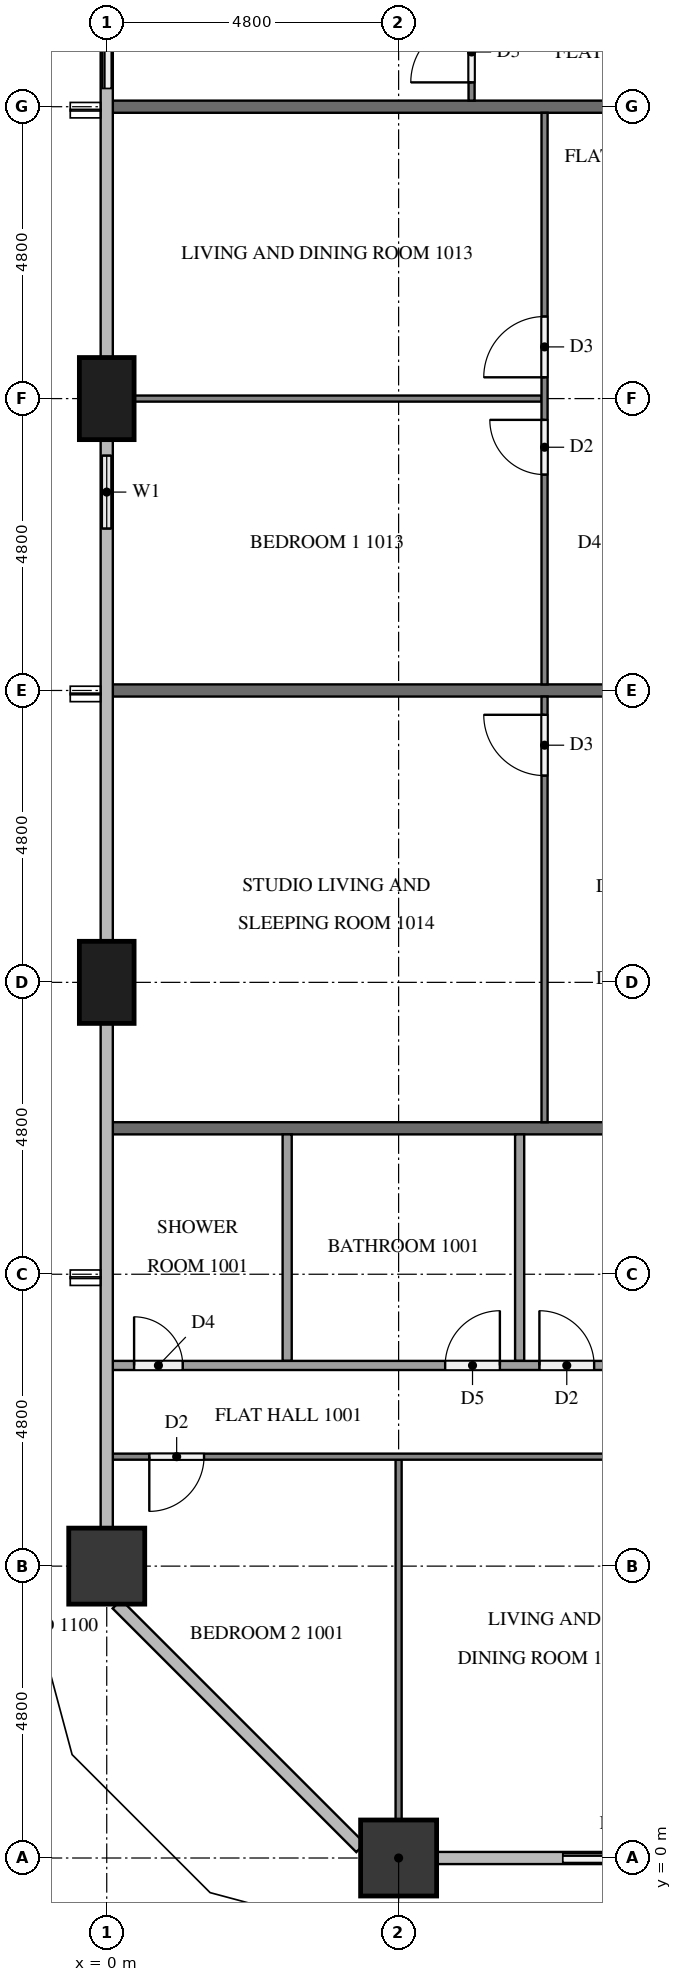
"""IFC4 building model, lengths in metres.
Left out: names, types, materials, properties, quantities, classifications, styles, units other than length and angle.
Written with IfcOpenShell. Run it as: python <this file> out.ifc"""

import sys

from ifc_helpers import new_model, si_unit, direction, frame, frame_2d, origin, origin_2d, place, context, subcontext, project, spatial, rectangle, extrude, element, fill, save


model = new_model("IFC4")
c1 = context("Model", 3, precision=1e-05, world=origin(), true_north=direction((0.0, 1.0)))
c2 = subcontext(c1, "Body", "Model", "MODEL_VIEW")
j1 = project(units=[si_unit("LENGTHUNIT", "METRE"), si_unit("PLANEANGLEUNIT", "RADIAN")], contexts=[c1])
p1 = place(None, origin())
s1 = spatial("IfcSite", under=j1, at=p1, CompositionType="ELEMENT")
p2 = place(p1, origin())
s2 = spatial("IfcBuilding", under=s1, at=p2, CompositionType="ELEMENT")
p3 = place(p2, frame((0.0, 0.0, 43.4)))
s3 = spatial("IfcBuildingStorey", under=s2, at=p3, CompositionType="ELEMENT", Elevation=43.4)
p4 = place(p3, frame((4.8, 0.0, 0.0), z_axis=(0.0, 0.0, 1.0), x_axis=(1.0, 0.0, 0.0)))
e1 = element("IfcColumn", 1, at=p4, inside=s3, PredefinedType="COLUMN", context=c2, shape_type="SweptSolid", body=[
    extrude(rectangle(XDim=1.25, YDim=1.25, at=origin_2d()), origin(), (0.0, 0.0, 1.0), 3.2),
])
for number, where, z_axis, x_axis in (
    (2, (0.0, 24.0, 0.0), (0.0, 0.0, 1.0), (0.0, 1.0, 0.0)),
    (3, (0.0, 14.4, 0.0), (0.0, 0.0, 1.0), (0.0, 1.0, 0.0)),
):
    element("IfcColumn", number, at=place(p3, frame(where, z_axis=z_axis, x_axis=x_axis)), inside=s3, PredefinedType="COLUMN", context=c2, shape_type="SweptSolid", body=[
        extrude(rectangle(XDim=1.35, YDim=0.9, at=origin_2d()), origin(), (0.0, 0.0, 1.0), 3.2),
    ])
p5 = place(p3, frame((0.0, 4.8, 0.0), z_axis=(0.0, 0.0, 1.0), x_axis=(1.0, 0.0, 0.0)))
e4 = element("IfcColumn", 4, at=p5, inside=s3, PredefinedType="COLUMN", context=c2, shape_type="SweptSolid", body=[
    extrude(rectangle(XDim=1.25, YDim=1.25, at=origin_2d()), origin(), (0.0, 0.0, 1.0), 3.2),
])
p6 = place(p3, frame((7.2, 0.0, 0.0), z_axis=(0.0, 0.0, 1.0), x_axis=(1.0, 0.0, 0.0)))
e5 = element("IfcWall", 5, at=p6, inside=s3, PredefinedType="SOLIDWALL", context=c2, shape_type="SweptSolid", body=[
    extrude(rectangle(XDim=2.4, YDim=0.15, at=frame_2d((1.2, 0.0))), origin(), (0.0, 0.0, 1.0), 3.2),
])
p7 = place(p6, frame((0.3, 0.0, 0.0)))
e6 = element("IfcOpeningElement", 6, at=p7, cuts=e5, PredefinedType="OPENING", context=c2, shape_type="SweptSolid", body=[
    extrude(rectangle(XDim=1.8, YDim=2.4, at=frame_2d((0.9, 1.2))), frame((0.0, 0.085, 0.0), z_axis=(0.0, -1.0, 0.0), x_axis=(1.0, 0.0, 0.0)), (0.0, 0.0, 1.0), 0.17),
])
p8 = place(p3, frame((0.0, 31.2, 0.0), z_axis=(0.0, 0.0, 1.0), x_axis=(0.0, -1.0, 0.0)))
e7 = element("IfcWall", 7, at=p8, inside=s3, PredefinedType="SOLIDWALL", context=c2, shape_type="SweptSolid", body=[
    extrude(rectangle(XDim=2.4, YDim=0.15, at=frame_2d((1.2, 0.0))), origin(), (0.0, 0.0, 1.0), 3.2),
])
p9 = place(p8, frame((0.3, 0.0, 0.0)))
e8 = element("IfcOpeningElement", 8, at=p9, cuts=e7, PredefinedType="OPENING", context=c2, shape_type="SweptSolid", body=[
    extrude(rectangle(XDim=1.8, YDim=2.4, at=frame_2d((0.9, 1.2))), frame((0.0, 0.085, 0.0), z_axis=(0.0, -1.0, 0.0), x_axis=(1.0, 0.0, 0.0)), (0.0, 0.0, 1.0), 0.17),
])
p10 = place(p3, frame((0.0, 23.325, 0.0), z_axis=(0.0, 0.0, 1.0), x_axis=(0.0, -1.0, 0.0)))
e9 = element("IfcWall", 9, at=p10, inside=s3, PredefinedType="SOLIDWALL", context=c2, shape_type="SweptSolid", body=[
    extrude(rectangle(XDim=1.725, YDim=0.15, at=frame_2d((0.862, 0.0))), origin(), (0.0, 0.0, 1.0), 3.2),
])
p11 = place(p10, frame((0.262, 0.0, 0.9)))
e10 = element("IfcOpeningElement", 10, at=p11, cuts=e9, PredefinedType="OPENING", context=c2, shape_type="SweptSolid", body=[
    extrude(rectangle(XDim=1.2, YDim=1.4, at=frame_2d((0.6, 0.7))), frame((0.0, 0.085, 0.0), z_axis=(0.0, -1.0, 0.0), x_axis=(1.0, 0.0, 0.0)), (0.0, 0.0, 1.0), 0.17),
])
for number, where, z_axis, x_axis in (
    (11, (0.1, 12.0, 0.0), (0.0, 0.0, 1.0), (1.0, 0.0, 0.0)),
    (12, (0.1, 28.8, 0.0), (0.0, 0.0, 1.0), (1.0, 0.0, 0.0)),
    (13, (0.1, 19.2, 0.0), (0.0, 0.0, 1.0), (1.0, 0.0, 0.0)),
):
    element("IfcWall", number, at=place(p3, frame(where, z_axis=z_axis, x_axis=x_axis)), inside=s3, PredefinedType="PARTITIONING", context=c2, shape_type="SweptSolid", body=[
        extrude(rectangle(XDim=11.8, YDim=0.2, at=frame_2d((5.9, 0.0))), origin(), (0.0, 0.0, 1.0), 3.2),
    ])
p12 = place(p3, frame((4.8, 6.55, 0.0), z_axis=(0.0, 0.0, 1.0), x_axis=(0.0, -1.0, 0.0)))
e14 = element("IfcWall", 14, at=p12, inside=s3, PredefinedType="PARTITIONING", context=c2, shape_type="SweptSolid", body=[
    extrude(rectangle(XDim=5.925, YDim=0.1, at=frame_2d((2.962, 0.0))), origin(), (0.0, 0.0, 1.0), 3.2),
])
p13 = place(p3, frame((14.3, 6.6, 0.0), z_axis=(0.0, 0.0, 1.0), x_axis=(-1.0, 0.0, 0.0)))
e15 = element("IfcWall", 15, at=p13, inside=s3, PredefinedType="PARTITIONING", context=c2, shape_type="SweptSolid", body=[
    extrude(rectangle(XDim=14.2, YDim=0.1, at=frame_2d((7.1, 0.0))), origin(), (0.0, 0.0, 1.0), 3.2),
])
p14 = place(p13, frame((3.45, 0.0, 0.0)))
e16 = element("IfcOpeningElement", 16, at=p14, cuts=e15, PredefinedType="OPENING", context=c2, shape_type="SweptSolid", body=[
    extrude(rectangle(XDim=0.9, YDim=2.1, at=frame_2d((0.45, 1.05))), frame((0.0, 0.06, 0.0), z_axis=(0.0, -1.0, 0.0), x_axis=(1.0, 0.0, 0.0)), (0.0, 0.0, 1.0), 0.12),
])
p15 = place(p13, frame((5.05, 0.0, 0.0)))
e17 = element("IfcOpeningElement", 17, at=p15, cuts=e15, PredefinedType="OPENING", context=c2, shape_type="SweptSolid", body=[
    extrude(rectangle(XDim=1.0, YDim=2.1, at=frame_2d((0.5, 1.05))), frame((0.0, 0.06, 0.0), z_axis=(0.0, -1.0, 0.0), x_axis=(1.0, 0.0, 0.0)), (0.0, 0.0, 1.0), 0.12),
])
p16 = place(p13, frame((12.7, 0.0, 0.0)))
e18 = element("IfcOpeningElement", 18, at=p16, cuts=e15, PredefinedType="OPENING", context=c2, shape_type="SweptSolid", body=[
    extrude(rectangle(XDim=0.9, YDim=2.1, at=frame_2d((0.45, 1.05))), frame((0.0, 0.06, 0.0), z_axis=(0.0, -1.0, 0.0), x_axis=(1.0, 0.0, 0.0)), (0.0, 0.0, 1.0), 0.12),
])
for number, where, z_axis, x_axis in (
    (19, (6.79, 11.9, 0.0), (0.0, 0.0, 1.0), (0.0, -1.0, 0.0)),
    (20, (2.967, 11.9, 0.0), (0.0, 0.0, 1.0), (0.0, -1.0, 0.0)),
):
    element("IfcWall", number, at=place(p3, frame(where, z_axis=z_axis, x_axis=x_axis)), inside=s3, PredefinedType="PARTITIONING", context=c2, shape_type="SweptSolid", body=[
        extrude(rectangle(XDim=3.725, YDim=0.15, at=frame_2d((1.862, 0.0))), origin(), (0.0, 0.0, 1.0), 3.2),
    ])
p17 = place(p3, frame((0.1, 8.1, 0.0), z_axis=(0.0, 0.0, 1.0), x_axis=(1.0, 0.0, 0.0)))
e21 = element("IfcWall", 21, at=p17, inside=s3, PredefinedType="PARTITIONING", context=c2, shape_type="SweptSolid", body=[
    extrude(rectangle(XDim=12.425, YDim=0.15, at=frame_2d((6.212, 0.0))), origin(), (0.0, 0.0, 1.0), 3.2),
])
p18 = place(p17, frame((7.015, 0.0, 0.0)))
e22 = element("IfcOpeningElement", 22, at=p18, cuts=e21, PredefinedType="OPENING", context=c2, shape_type="SweptSolid", body=[
    extrude(rectangle(XDim=0.9, YDim=2.1, at=frame_2d((0.45, 1.05))), frame((0.0, 0.085, 0.0), z_axis=(0.0, -1.0, 0.0), x_axis=(1.0, 0.0, 0.0)), (0.0, 0.0, 1.0), 0.17),
])
p19 = place(p17, frame((5.465, 0.0, 0.0)))
e23 = element("IfcOpeningElement", 23, at=p19, cuts=e21, PredefinedType="OPENING", context=c2, shape_type="SweptSolid", body=[
    extrude(rectangle(XDim=0.9, YDim=2.1, at=frame_2d((0.45, 1.05))), frame((0.0, 0.085, 0.0), z_axis=(0.0, -1.0, 0.0), x_axis=(1.0, 0.0, 0.0)), (0.0, 0.0, 1.0), 0.17),
])
p20 = place(p17, frame((0.35, 0.0, 0.0)))
e24 = element("IfcOpeningElement", 24, at=p20, cuts=e21, PredefinedType="OPENING", context=c2, shape_type="SweptSolid", body=[
    extrude(rectangle(XDim=0.8, YDim=2.1, at=frame_2d((0.4, 1.05))), frame((0.0, 0.085, 0.0), z_axis=(0.0, -1.0, 0.0), x_axis=(1.0, 0.0, 0.0)), (0.0, 0.0, 1.0), 0.17),
])
p21 = place(p3, frame((6.0, 28.9, 0.0), z_axis=(0.0, 0.0, 1.0), x_axis=(0.0, 1.0, 0.0)))
e25 = element("IfcWall", 25, at=p21, inside=s3, PredefinedType="PARTITIONING", context=c2, shape_type="SweptSolid", body=[
    extrude(rectangle(XDim=9.4, YDim=0.1, at=frame_2d((4.7, 0.0))), origin(), (0.0, 0.0, 1.0), 3.2),
])
p22 = place(p21, frame((0.3, 0.0, 0.0)))
e26 = element("IfcOpeningElement", 26, at=p22, cuts=e25, PredefinedType="OPENING", context=c2, shape_type="SweptSolid", body=[
    extrude(rectangle(XDim=1.0, YDim=2.1, at=frame_2d((0.5, 1.05))), frame((0.0, 0.06, 0.0), z_axis=(0.0, -1.0, 0.0), x_axis=(1.0, 0.0, 0.0)), (0.0, 0.0, 1.0), 0.12),
])
p23 = place(p21, frame((8.2, 0.0, 0.0)))
e27 = element("IfcOpeningElement", 27, at=p23, cuts=e25, PredefinedType="OPENING", context=c2, shape_type="SweptSolid", body=[
    extrude(rectangle(XDim=0.9, YDim=2.1, at=frame_2d((0.45, 1.05))), frame((0.0, 0.06, 0.0), z_axis=(0.0, -1.0, 0.0), x_axis=(1.0, 0.0, 0.0)), (0.0, 0.0, 1.0), 0.12),
])
p24 = place(p3, frame((7.15, 24.0, 0.0), z_axis=(0.0, 0.0, 1.0), x_axis=(-1.0, 0.0, 0.0)))
e28 = element("IfcWall", 28, at=p24, inside=s3, PredefinedType="PARTITIONING", context=c2, shape_type="SweptSolid", body=[
    extrude(rectangle(XDim=6.7, YDim=0.1, at=frame_2d((3.35, 0.0))), origin(), (0.0, 0.0, 1.0), 3.2),
])
p25 = place(p3, frame((7.2, 19.3, 0.0), z_axis=(0.0, 0.0, 1.0), x_axis=(0.0, 1.0, 0.0)))
e29 = element("IfcWall", 29, at=p25, inside=s3, PredefinedType="PARTITIONING", context=c2, shape_type="SweptSolid", body=[
    extrude(rectangle(XDim=9.4, YDim=0.1, at=frame_2d((4.7, 0.0))), origin(), (0.0, 0.0, 1.0), 3.2),
])
p26 = place(p25, frame((5.05, 0.0, 0.0)))
e30 = element("IfcOpeningElement", 30, at=p26, cuts=e29, PredefinedType="OPENING", context=c2, shape_type="SweptSolid", body=[
    extrude(rectangle(XDim=1.0, YDim=2.1, at=frame_2d((0.5, 1.05))), frame((0.0, 0.06, 0.0), z_axis=(0.0, -1.0, 0.0), x_axis=(1.0, 0.0, 0.0)), (0.0, 0.0, 1.0), 0.12),
])
p27 = place(p25, frame((3.45, 0.0, 0.0)))
e31 = element("IfcOpeningElement", 31, at=p27, cuts=e29, PredefinedType="OPENING", context=c2, shape_type="SweptSolid", body=[
    extrude(rectangle(XDim=0.9, YDim=2.1, at=frame_2d((0.45, 1.05))), frame((0.0, 0.06, 0.0), z_axis=(0.0, -1.0, 0.0), x_axis=(1.0, 0.0, 0.0)), (0.0, 0.0, 1.0), 0.12),
])
p28 = place(p3, frame((7.2, 12.1, 0.0), z_axis=(0.0, 0.0, 1.0), x_axis=(0.0, 1.0, 0.0)))
e32 = element("IfcWall", 32, at=p28, inside=s3, PredefinedType="PARTITIONING", context=c2, shape_type="SweptSolid", body=[
    extrude(rectangle(XDim=7.0, YDim=0.1, at=frame_2d((3.5, 0.0))), origin(), (0.0, 0.0, 1.0), 3.2),
])
p29 = place(p28, frame((5.7, 0.0, 0.0)))
e33 = element("IfcOpeningElement", 33, at=p29, cuts=e32, PredefinedType="OPENING", context=c2, shape_type="SweptSolid", body=[
    extrude(rectangle(XDim=1.0, YDim=2.1, at=frame_2d((0.5, 1.05))), frame((0.0, 0.06, 0.0), z_axis=(0.0, -1.0, 0.0), x_axis=(1.0, 0.0, 0.0)), (0.0, 0.0, 1.0), 0.12),
])
p30 = place(p7, origin())
e34 = element("IfcDoor", 34, at=p30, inside=s3, OperationType="SLIDING_TO_LEFT", PredefinedType="DOOR", context=c2, shape_type="SweptSolid", body=[
    extrude(rectangle(XDim=1.8, YDim=2.4, at=frame_2d((0.9, 1.2))), frame((0.0, 0.025, 0.0), z_axis=(0.0, -1.0, 0.0), x_axis=(1.0, 0.0, 0.0)), (0.0, 0.0, 1.0), 0.05),
])
fill(e6, e34)
p31 = place(p9, origin())
e35 = element("IfcDoor", 35, at=p31, inside=s3, OperationType="SLIDING_TO_RIGHT", PredefinedType="DOOR", context=c2, shape_type="SweptSolid", body=[
    extrude(rectangle(XDim=1.8, YDim=2.4, at=frame_2d((0.9, 1.2))), frame((0.0, 0.025, 0.0), z_axis=(0.0, -1.0, 0.0), x_axis=(1.0, 0.0, 0.0)), (0.0, 0.0, 1.0), 0.05),
])
fill(e8, e35)
p32 = place(p11, origin())
e36 = element("IfcWindow", 36, at=p32, inside=s3, PartitioningType="SINGLE_PANEL", PredefinedType="WINDOW", context=c2, shape_type="SweptSolid", body=[
    extrude(rectangle(XDim=1.2, YDim=1.4, at=frame_2d((0.6, 0.7))), frame((0.0, 0.03, 0.0), z_axis=(0.0, -1.0, 0.0), x_axis=(1.0, 0.0, 0.0)), (0.0, 0.0, 1.0), 0.06),
])
fill(e10, e36)
p33 = place(p16, origin())
e37 = element("IfcDoor", 37, at=p33, inside=s3, OperationType="SINGLE_SWING_RIGHT", PredefinedType="DOOR", context=c2, shape_type="SweptSolid", body=[
    extrude(rectangle(XDim=0.9, YDim=2.1, at=frame_2d((0.45, 1.05))), frame((0.0, 0.025, 0.0), z_axis=(0.0, -1.0, 0.0), x_axis=(1.0, 0.0, 0.0)), (0.0, 0.0, 1.0), 0.05),
])
fill(e18, e37)
p34 = place(p18, origin())
e38 = element("IfcDoor", 38, at=p34, inside=s3, OperationType="SINGLE_SWING_LEFT", PredefinedType="DOOR", context=c2, shape_type="SweptSolid", body=[
    extrude(rectangle(XDim=0.9, YDim=2.1, at=frame_2d((0.45, 1.05))), frame((0.0, 0.025, 0.0), z_axis=(0.0, -1.0, 0.0), x_axis=(1.0, 0.0, 0.0)), (0.0, 0.0, 1.0), 0.05),
])
fill(e22, e38)
p35 = place(p19, origin())
e39 = element("IfcDoor", 39, at=p35, inside=s3, OperationType="SINGLE_SWING_RIGHT", PredefinedType="DOOR", context=c2, shape_type="SweptSolid", body=[
    extrude(rectangle(XDim=0.9, YDim=2.1, at=frame_2d((0.45, 1.05))), frame((0.0, 0.025, 0.0), z_axis=(0.0, -1.0, 0.0), x_axis=(1.0, 0.0, 0.0)), (0.0, 0.0, 1.0), 0.05),
])
fill(e23, e39)
p36 = place(p20, origin())
e40 = element("IfcDoor", 40, at=p36, inside=s3, OperationType="SINGLE_SWING_LEFT", PredefinedType="DOOR", context=c2, shape_type="SweptSolid", body=[
    extrude(rectangle(XDim=0.8, YDim=2.1, at=frame_2d((0.4, 1.05))), frame((0.0, 0.025, 0.0), z_axis=(0.0, -1.0, 0.0), x_axis=(1.0, 0.0, 0.0)), (0.0, 0.0, 1.0), 0.05),
])
fill(e24, e40)
p37 = place(p22, origin())
e41 = element("IfcDoor", 41, at=p37, inside=s3, OperationType="SINGLE_SWING_LEFT", PredefinedType="DOOR", context=c2, shape_type="SweptSolid", body=[
    extrude(rectangle(XDim=1.0, YDim=2.1, at=frame_2d((0.5, 1.05))), frame((0.0, 0.025, 0.0), z_axis=(0.0, -1.0, 0.0), x_axis=(1.0, 0.0, 0.0)), (0.0, 0.0, 1.0), 0.05),
])
fill(e26, e41)
p38 = place(p26, origin())
e42 = element("IfcDoor", 42, at=p38, inside=s3, OperationType="SINGLE_SWING_LEFT", PredefinedType="DOOR", context=c2, shape_type="SweptSolid", body=[
    extrude(rectangle(XDim=1.0, YDim=2.1, at=frame_2d((0.5, 1.05))), frame((0.0, 0.025, 0.0), z_axis=(0.0, -1.0, 0.0), x_axis=(1.0, 0.0, 0.0)), (0.0, 0.0, 1.0), 0.05),
])
fill(e30, e42)
p39 = place(p27, origin())
e43 = element("IfcDoor", 43, at=p39, inside=s3, OperationType="SINGLE_SWING_RIGHT", PredefinedType="DOOR", context=c2, shape_type="SweptSolid", body=[
    extrude(rectangle(XDim=0.9, YDim=2.1, at=frame_2d((0.45, 1.05))), frame((0.0, 0.025, 0.0), z_axis=(0.0, -1.0, 0.0), x_axis=(1.0, 0.0, 0.0)), (0.0, 0.0, 1.0), 0.05),
])
fill(e31, e43)
p40 = place(p29, origin())
e44 = element("IfcDoor", 44, at=p40, inside=s3, OperationType="SINGLE_SWING_RIGHT", PredefinedType="DOOR", context=c2, shape_type="SweptSolid", body=[
    extrude(rectangle(XDim=1.0, YDim=2.1, at=frame_2d((0.5, 1.05))), frame((0.0, 0.025, 0.0), z_axis=(0.0, -1.0, 0.0), x_axis=(1.0, 0.0, 0.0)), (0.0, 0.0, 1.0), 0.05),
])
fill(e33, e44)
save(model, sys.argv[1])
